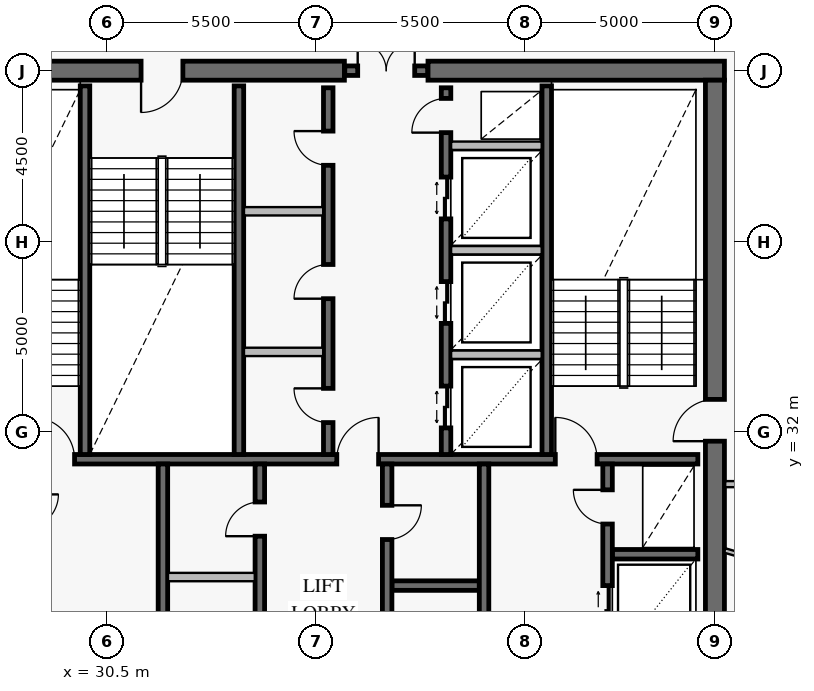
"""IFC4 building model, lengths in metres.
Left out: names, types, materials, properties, quantities, classifications, styles, units other than length and angle.
Written with IfcOpenShell. Run it as: python <this file> out.ifc"""

import sys

from ifc_helpers import new_model, si_unit, direction, frame, frame_2d, origin, place, context, subcontext, project, spatial, rectangle, extrude, element, fill, save


model = new_model("IFC4")
c1 = context("Model", 3, precision=1e-05, world=origin(), true_north=direction((0.0, 1.0)))
c2 = subcontext(c1, "Body", "Model", "MODEL_VIEW")
j1 = project(units=[si_unit("LENGTHUNIT", "METRE"), si_unit("PLANEANGLEUNIT", "RADIAN")], contexts=[c1])
p1 = place(None, origin())
s1 = spatial("IfcSite", under=j1, at=p1, CompositionType="ELEMENT")
p2 = place(p1, origin())
s2 = spatial("IfcBuilding", under=s1, at=p2, CompositionType="ELEMENT")
p3 = place(p2, frame((0.0, 0.0, 342.4)))
s3 = spatial("IfcBuildingStorey", under=s2, at=p3, CompositionType="ELEMENT", Elevation=342.4)
p4 = place(p3, frame((46.75, 41.5, 0.0), z_axis=(0.0, 0.0, 1.0), x_axis=(-1.0, 0.0, 0.0)))
e1 = element("IfcWall", 1, at=p4, inside=s3, PredefinedType="SHEAR", context=c2, shape_type="SweptSolid", body=[
    extrude(rectangle(XDim=7.8, YDim=0.5, at=frame_2d((3.9, 0.0))), origin(), (0.0, 0.0, 1.0), 3.8),
])
p5 = place(p3, frame((36.75, 41.5, 0.0), z_axis=(0.0, 0.0, 1.0), x_axis=(-1.0, 0.0, 0.0)))
e2 = element("IfcWall", 2, at=p5, inside=s3, PredefinedType="SHEAR", context=c2, shape_type="SweptSolid", body=[
    extrude(rectangle(XDim=11.5, YDim=0.5, at=frame_2d((5.75, 0.0))), origin(), (0.0, 0.0, 1.0), 3.8),
])
p6 = place(p5, frame((4.25, 0.0, 0.0)))
e3 = element("IfcOpeningElement", 3, at=p6, cuts=e2, PredefinedType="OPENING", context=c2, shape_type="SweptSolid", body=[
    extrude(rectangle(XDim=1.1, YDim=2.15, at=frame_2d((0.55, 1.075))), frame((0.0, 0.262, 0.0), z_axis=(0.0, -1.0, 0.0), x_axis=(1.0, 0.0, 0.0)), (0.0, 0.0, 1.0), 0.524),
])
p7 = place(p3, frame((46.5, 22.75, 0.0), z_axis=(0.0, 0.0, 1.0), x_axis=(0.0, 1.0, 0.0)))
e4 = element("IfcWall", 4, at=p7, inside=s3, PredefinedType="SHEAR", context=c2, shape_type="SweptSolid", body=[
    extrude(rectangle(XDim=18.5, YDim=0.5, at=frame_2d((9.25, 0.0))), origin(), (0.0, 0.0, 1.0), 3.8),
])
p8 = place(p7, frame((9.0, 0.0, 0.0)))
e5 = element("IfcOpeningElement", 5, at=p8, cuts=e4, PredefinedType="OPENING", context=c2, shape_type="SweptSolid", body=[
    extrude(rectangle(XDim=1.1, YDim=2.15, at=frame_2d((0.55, 1.075))), frame((0.0, 0.262, 0.0), z_axis=(0.0, -1.0, 0.0), x_axis=(1.0, 0.0, 0.0)), (0.0, 0.0, 1.0), 0.524),
])
p9 = place(p3, frame((36.76, 41.5, 0.0), z_axis=(0.0, 0.0, 1.0), x_axis=(1.0, 0.0, 0.0)))
e6 = element("IfcWall", 6, at=p9, inside=s3, PredefinedType="SOLIDWALL", context=c2, shape_type="SweptSolid", body=[
    extrude(rectangle(XDim=2.18, YDim=0.25, at=frame_2d((1.09, 0.0))), origin(), (0.0, 0.0, 1.0), 3.8),
])
p10 = place(p9, frame((0.34, 0.0, 0.0)))
e7 = element("IfcOpeningElement", 7, at=p10, cuts=e6, PredefinedType="OPENING", context=c2, shape_type="SweptSolid", body=[
    extrude(rectangle(XDim=1.5, YDim=2.15, at=frame_2d((0.75, 1.075))), frame((0.0, 0.137, 0.0), z_axis=(0.0, -1.0, 0.0), x_axis=(1.0, 0.0, 0.0)), (0.0, 0.0, 1.0), 0.274),
])
p11 = place(p3, frame((25.95, 31.275, 0.0), z_axis=(0.0, 0.0, 1.0), x_axis=(1.0, 0.0, 0.0)))
e8 = element("IfcWall", 8, at=p11, inside=s3, PredefinedType="SOLIDWALL", context=c2, shape_type="SweptSolid", body=[
    extrude(rectangle(XDim=20.1, YDim=0.25, at=frame_2d((10.05, 0.0))), origin(), (0.0, 0.0, 1.0), 3.8),
])
p12 = place(p11, frame((2.6, 0.0, 0.0)))
e9 = element("IfcOpeningElement", 9, at=p12, cuts=e8, PredefinedType="OPENING", context=c2, shape_type="SweptSolid", body=[
    extrude(rectangle(XDim=1.1, YDim=2.15, at=frame_2d((0.55, 1.075))), frame((0.0, 0.137, 0.0), z_axis=(0.0, -1.0, 0.0), x_axis=(1.0, 0.0, 0.0)), (0.0, 0.0, 1.0), 0.274),
])
p13 = place(p11, frame((10.6, 0.0, 0.0)))
e10 = element("IfcOpeningElement", 10, at=p13, cuts=e8, PredefinedType="OPENING", context=c2, shape_type="SweptSolid", body=[
    extrude(rectangle(XDim=1.1, YDim=2.15, at=frame_2d((0.55, 1.075))), frame((0.0, 0.137, 0.0), z_axis=(0.0, -1.0, 0.0), x_axis=(1.0, 0.0, 0.0)), (0.0, 0.0, 1.0), 0.274),
])
p14 = place(p11, frame((16.35, 0.0, 0.0)))
e11 = element("IfcOpeningElement", 11, at=p14, cuts=e8, PredefinedType="OPENING", context=c2, shape_type="SweptSolid", body=[
    extrude(rectangle(XDim=1.1, YDim=2.15, at=frame_2d((0.55, 1.075))), frame((0.0, 0.137, 0.0), z_axis=(0.0, -1.0, 0.0), x_axis=(1.0, 0.0, 0.0)), (0.0, 0.0, 1.0), 0.274),
])
for number, where, z_axis, x_axis in (
    (12, (29.925, 31.4, 0.0), (0.0, 0.0, 1.0), (0.0, 1.0, 0.0)),
    (13, (33.975, 31.4, 0.0), (0.0, 0.0, 1.0), (0.0, 1.0, 0.0)),
    (14, (42.075, 31.4, 0.0), (0.0, 0.0, 1.0), (0.0, 1.0, 0.0)),
):
    element("IfcWall", number, at=place(p3, frame(where, z_axis=z_axis, x_axis=x_axis)), inside=s3, PredefinedType="SOLIDWALL", context=c2, shape_type="SweptSolid", body=[
        extrude(rectangle(XDim=9.7, YDim=0.25, at=frame_2d((4.85, 0.0))), origin(), (0.0, 0.0, 1.0), 3.8),
    ])
p15 = place(p3, frame((36.325, 31.4, 0.0), z_axis=(0.0, 0.0, 1.0), x_axis=(0.0, 1.0, 0.0)))
e15 = element("IfcWall", 15, at=p15, inside=s3, PredefinedType="SOLIDWALL", context=c2, shape_type="SweptSolid", body=[
    extrude(rectangle(XDim=9.65, YDim=0.25, at=frame_2d((4.825, 0.0))), origin(), (0.0, 0.0, 1.0), 3.8),
])
p16 = place(p15, frame((0.84, 0.0, 0.0)))
e16 = element("IfcOpeningElement", 16, at=p16, cuts=e15, PredefinedType="OPENING", context=c2, shape_type="SweptSolid", body=[
    extrude(rectangle(XDim=0.9, YDim=2.1, at=frame_2d((0.45, 1.05))), frame((0.0, 0.137, 0.0), z_axis=(0.0, -1.0, 0.0), x_axis=(1.0, 0.0, 0.0)), (0.0, 0.0, 1.0), 0.274),
])
p17 = place(p15, frame((4.1, 0.0, 0.0)))
e17 = element("IfcOpeningElement", 17, at=p17, cuts=e15, PredefinedType="OPENING", context=c2, shape_type="SweptSolid", body=[
    extrude(rectangle(XDim=0.9, YDim=2.1, at=frame_2d((0.45, 1.05))), frame((0.0, 0.137, 0.0), z_axis=(0.0, -1.0, 0.0), x_axis=(1.0, 0.0, 0.0)), (0.0, 0.0, 1.0), 0.274),
])
p18 = place(p15, frame((7.61, 0.0, 0.0)))
e18 = element("IfcOpeningElement", 18, at=p18, cuts=e15, PredefinedType="OPENING", context=c2, shape_type="SweptSolid", body=[
    extrude(rectangle(XDim=0.9, YDim=2.1, at=frame_2d((0.45, 1.05))), frame((0.0, 0.137, 0.0), z_axis=(0.0, -1.0, 0.0), x_axis=(1.0, 0.0, 0.0)), (0.0, 0.0, 1.0), 0.274),
])
p19 = place(p3, frame((39.425, 31.4, 0.0), z_axis=(0.0, 0.0, 1.0), x_axis=(0.0, 1.0, 0.0)))
e19 = element("IfcWall", 19, at=p19, inside=s3, PredefinedType="SOLIDWALL", context=c2, shape_type="SweptSolid", body=[
    extrude(rectangle(XDim=9.65, YDim=0.25, at=frame_2d((4.825, 0.0))), origin(), (0.0, 0.0, 1.0), 3.8),
])
p20 = place(p19, frame((0.7, 0.0, 0.0)))
e20 = element("IfcOpeningElement", 20, at=p20, cuts=e19, PredefinedType="OPENING", context=c2, shape_type="SweptSolid", body=[
    extrude(rectangle(XDim=1.1, YDim=2.2, at=frame_2d((0.55, 1.1))), frame((0.0, 0.137, 0.0), z_axis=(0.0, -1.0, 0.0), x_axis=(1.0, 0.0, 0.0)), (0.0, 0.0, 1.0), 0.274),
])
p21 = place(p19, frame((3.45, 0.0, 0.0)))
e21 = element("IfcOpeningElement", 21, at=p21, cuts=e19, PredefinedType="OPENING", context=c2, shape_type="SweptSolid", body=[
    extrude(rectangle(XDim=1.1, YDim=2.2, at=frame_2d((0.55, 1.1))), frame((0.0, 0.137, 0.0), z_axis=(0.0, -1.0, 0.0), x_axis=(1.0, 0.0, 0.0)), (0.0, 0.0, 1.0), 0.274),
])
p22 = place(p19, frame((6.2, 0.0, 0.0)))
e22 = element("IfcOpeningElement", 22, at=p22, cuts=e19, PredefinedType="OPENING", context=c2, shape_type="SweptSolid", body=[
    extrude(rectangle(XDim=1.1, YDim=2.2, at=frame_2d((0.55, 1.1))), frame((0.0, 0.137, 0.0), z_axis=(0.0, -1.0, 0.0), x_axis=(1.0, 0.0, 0.0)), (0.0, 0.0, 1.0), 0.274),
])
p23 = place(p19, frame((8.47, 0.0, 0.0)))
e23 = element("IfcOpeningElement", 23, at=p23, cuts=e19, PredefinedType="OPENING", context=c2, shape_type="SweptSolid", body=[
    extrude(rectangle(XDim=0.9, YDim=2.1, at=frame_2d((0.45, 1.05))), frame((0.0, 0.137, 0.0), z_axis=(0.0, -1.0, 0.0), x_axis=(1.0, 0.0, 0.0)), (0.0, 0.0, 1.0), 0.274),
])
p24 = place(p3, frame((31.975, 22.95, 0.0), z_axis=(0.0, 0.0, 1.0), x_axis=(0.0, 1.0, 0.0)))
e24 = element("IfcWall", 24, at=p24, inside=s3, PredefinedType="SOLIDWALL", context=c2, shape_type="SweptSolid", body=[
    extrude(rectangle(XDim=8.2, YDim=0.25, at=frame_2d((4.1, 0.0))), origin(), (0.0, 0.0, 1.0), 3.8),
])
p25 = place(p3, frame((34.525, 22.95, 0.0), z_axis=(0.0, 0.0, 1.0), x_axis=(0.0, 1.0, 0.0)))
e25 = element("IfcWall", 25, at=p25, inside=s3, PredefinedType="SOLIDWALL", context=c2, shape_type="SweptSolid", body=[
    extrude(rectangle(XDim=8.2, YDim=0.25, at=frame_2d((4.1, 0.0))), origin(), (0.0, 0.0, 1.0), 3.8),
])
p26 = place(p25, frame((2.1, 0.0, 0.0)))
e26 = element("IfcOpeningElement", 26, at=p26, cuts=e25, PredefinedType="OPENING", context=c2, shape_type="SweptSolid", body=[
    extrude(rectangle(XDim=0.9, YDim=2.1, at=frame_2d((0.45, 1.05))), frame((0.0, 0.137, 0.0), z_axis=(0.0, -1.0, 0.0), x_axis=(1.0, 0.0, 0.0)), (0.0, 0.0, 1.0), 0.274),
])
p27 = place(p25, frame((6.3, 0.0, 0.0)))
e27 = element("IfcOpeningElement", 27, at=p27, cuts=e25, PredefinedType="OPENING", context=c2, shape_type="SweptSolid", body=[
    extrude(rectangle(XDim=0.9, YDim=2.1, at=frame_2d((0.45, 1.05))), frame((0.0, 0.137, 0.0), z_axis=(0.0, -1.0, 0.0), x_axis=(1.0, 0.0, 0.0)), (0.0, 0.0, 1.0), 0.274),
])
p28 = place(p3, frame((38.0, 27.95, 0.0), z_axis=(0.0, 0.0, 1.0), x_axis=(1.0, 0.0, 0.0)))
e28 = element("IfcWall", 28, at=p28, inside=s3, PredefinedType="SOLIDWALL", context=c2, shape_type="SweptSolid", body=[
    extrude(rectangle(XDim=2.3, YDim=0.25, at=frame_2d((1.15, 0.0))), origin(), (0.0, 0.0, 1.0), 3.8),
])
p29 = place(p3, frame((37.875, 22.95, 0.0), z_axis=(0.0, 0.0, 1.0), x_axis=(0.0, 1.0, 0.0)))
e29 = element("IfcWall", 29, at=p29, inside=s3, PredefinedType="SOLIDWALL", context=c2, shape_type="SweptSolid", body=[
    extrude(rectangle(XDim=8.2, YDim=0.25, at=frame_2d((4.1, 0.0))), origin(), (0.0, 0.0, 1.0), 3.8),
])
p30 = place(p29, frame((2.012, 0.0, 0.0)))
e30 = element("IfcOpeningElement", 30, at=p30, cuts=e29, PredefinedType="OPENING", context=c2, shape_type="SweptSolid", body=[
    extrude(rectangle(XDim=0.9, YDim=2.1, at=frame_2d((0.45, 1.05))), frame((0.0, 0.137, 0.0), z_axis=(0.0, -1.0, 0.0), x_axis=(1.0, 0.0, 0.0)), (0.0, 0.0, 1.0), 0.274),
])
p31 = place(p29, frame((6.212, 0.0, 0.0)))
e31 = element("IfcOpeningElement", 31, at=p31, cuts=e29, PredefinedType="OPENING", context=c2, shape_type="SweptSolid", body=[
    extrude(rectangle(XDim=0.9, YDim=2.1, at=frame_2d((0.45, 1.05))), frame((0.0, 0.137, 0.0), z_axis=(0.0, -1.0, 0.0), x_axis=(1.0, 0.0, 0.0)), (0.0, 0.0, 1.0), 0.274),
])
p32 = place(p3, frame((40.425, 22.95, 0.0), z_axis=(0.0, 0.0, 1.0), x_axis=(0.0, 1.0, 0.0)))
e32 = element("IfcWall", 32, at=p32, inside=s3, PredefinedType="SOLIDWALL", context=c2, shape_type="SweptSolid", body=[
    extrude(rectangle(XDim=8.2, YDim=0.25, at=frame_2d((4.1, 0.0))), origin(), (0.0, 0.0, 1.0), 3.8),
])
p33 = place(p3, frame((43.8, 28.775, 0.0), z_axis=(0.0, 0.0, 1.0), x_axis=(1.0, 0.0, 0.0)))
e33 = element("IfcWall", 33, at=p33, inside=s3, PredefinedType="SOLIDWALL", context=c2, shape_type="SweptSolid", body=[
    extrude(rectangle(XDim=2.25, YDim=0.25, at=frame_2d((1.125, 0.0))), origin(), (0.0, 0.0, 1.0), 3.8),
])
p34 = place(p3, frame((43.675, 22.95, 0.0), z_axis=(0.0, 0.0, 1.0), x_axis=(0.0, 1.0, 0.0)))
e34 = element("IfcWall", 34, at=p34, inside=s3, PredefinedType="SOLIDWALL", context=c2, shape_type="SweptSolid", body=[
    extrude(rectangle(XDim=8.2, YDim=0.25, at=frame_2d((4.1, 0.0))), origin(), (0.0, 0.0, 1.0), 3.8),
])
p35 = place(p34, frame((0.75, 0.0, 0.0)))
e35 = element("IfcOpeningElement", 35, at=p35, cuts=e34, PredefinedType="OPENING", context=c2, shape_type="SweptSolid", body=[
    extrude(rectangle(XDim=1.3, YDim=2.3, at=frame_2d((0.65, 1.15))), frame((0.0, 0.137, 0.0), z_axis=(0.0, -1.0, 0.0), x_axis=(1.0, 0.0, 0.0)), (0.0, 0.0, 1.0), 0.274),
])
p36 = place(p34, frame((3.7, 0.0, 0.0)))
e36 = element("IfcOpeningElement", 36, at=p36, cuts=e34, PredefinedType="OPENING", context=c2, shape_type="SweptSolid", body=[
    extrude(rectangle(XDim=1.3, YDim=2.3, at=frame_2d((0.65, 1.15))), frame((0.0, 0.137, 0.0), z_axis=(0.0, -1.0, 0.0), x_axis=(1.0, 0.0, 0.0)), (0.0, 0.0, 1.0), 0.274),
])
p37 = place(p34, frame((6.62, 0.0, 0.0)))
e37 = element("IfcOpeningElement", 37, at=p37, cuts=e34, PredefinedType="OPENING", context=c2, shape_type="SweptSolid", body=[
    extrude(rectangle(XDim=0.9, YDim=2.1, at=frame_2d((0.45, 1.05))), frame((0.0, 0.137, 0.0), z_axis=(0.0, -1.0, 0.0), x_axis=(1.0, 0.0, 0.0)), (0.0, 0.0, 1.0), 0.274),
])
p38 = place(p3, frame((46.758, 28.875, 0.0), z_axis=(0.0, 0.0, 1.0), x_axis=(0.960290635707, -0.279001603891, 0.0)))
e38 = element("IfcWall", 38, at=p38, inside=s3, PredefinedType="PARTITIONING", context=c2, shape_type="SweptSolid", body=[
    extrude(rectangle(XDim=3.757, YDim=0.12, at=frame_2d((1.878, 0.0))), origin(), (0.0, 0.0, 1.0), 3.0),
])
p39 = place(p38, frame((1.108, 0.0, 0.0)))
e39 = element("IfcOpeningElement", 39, at=p39, cuts=e38, PredefinedType="OPENING", context=c2, shape_type="SweptSolid", body=[
    extrude(rectangle(XDim=0.9, YDim=2.1, at=frame_2d((0.45, 1.05))), frame((0.0, 0.072, 0.0), z_axis=(0.0, -1.0, 0.0), x_axis=(1.0, 0.0, 0.0)), (0.0, 0.0, 1.0), 0.144),
])
for number, where, z_axis, x_axis in (
    (40, (34.108, 34.1, 0.0), (0.0, 0.0, 1.0), (1.0, 0.0, 0.0)),
    (41, (34.108, 37.8, 0.0), (0.0, 0.0, 1.0), (1.0, 0.0, 0.0)),
):
    element("IfcWall", number, at=place(p3, frame(where, z_axis=z_axis, x_axis=x_axis)), inside=s3, PredefinedType="PARTITIONING", context=c2, shape_type="SweptSolid", body=[
        extrude(rectangle(XDim=2.084, YDim=0.22, at=frame_2d((1.042, 0.0))), origin(), (0.0, 0.0, 1.0), 3.55),
    ])
for number, where, z_axis, x_axis in (
    (42, (39.558, 34.025, 0.0), (0.0, 0.0, 1.0), (1.0, 0.0, 0.0)),
    (43, (39.558, 36.775, 0.0), (0.0, 0.0, 1.0), (1.0, 0.0, 0.0)),
    (44, (39.558, 39.525, 0.0), (0.0, 0.0, 1.0), (1.0, 0.0, 0.0)),
):
    element("IfcWall", number, at=place(p3, frame(where, z_axis=z_axis, x_axis=x_axis)), inside=s3, PredefinedType="PARTITIONING", context=c2, shape_type="SweptSolid", body=[
        extrude(rectangle(XDim=2.384, YDim=0.22, at=frame_2d((1.192, 0.0))), origin(), (0.0, 0.0, 1.0), 3.55),
    ])
p40 = place(p3, frame((32.108, 28.175, 0.0), z_axis=(0.0, 0.0, 1.0), x_axis=(1.0, 0.0, 0.0)))
e45 = element("IfcWall", 45, at=p40, inside=s3, PredefinedType="PARTITIONING", context=c2, shape_type="SweptSolid", body=[
    extrude(rectangle(XDim=2.284, YDim=0.22, at=frame_2d((1.142, 0.0))), origin(), (0.0, 0.0, 1.0), 3.55),
])
p41 = place(p3, frame((46.77, 30.62, 0.0), z_axis=(0.0, 0.0, 1.0), x_axis=(1.0, 0.0, 0.0)))
e46 = element("IfcWall", 46, at=p41, inside=s3, PredefinedType="PARTITIONING", context=c2, shape_type="SweptSolid", body=[
    extrude(rectangle(XDim=2.03, YDim=0.16, at=frame_2d((1.015, 0.0))), origin(), (0.0, 0.0, 1.0), 3.55),
])
p42 = place(p8, origin())
e47 = element("IfcDoor", 47, at=p42, inside=s3, OperationType="SINGLE_SWING_LEFT", PredefinedType="USERDEFINED", context=c2, shape_type="SweptSolid", body=[
    extrude(rectangle(XDim=1.1, YDim=2.15, at=frame_2d((0.55, 1.075))), frame((0.0, 0.025, 0.0), z_axis=(0.0, -1.0, 0.0), x_axis=(1.0, 0.0, 0.0)), (0.0, 0.0, 1.0), 0.05),
])
fill(e5, e47)
p43 = place(p6, origin())
e48 = element("IfcDoor", 48, at=p43, inside=s3, OperationType="SINGLE_SWING_RIGHT", PredefinedType="USERDEFINED", context=c2, shape_type="SweptSolid", body=[
    extrude(rectangle(XDim=1.1, YDim=2.15, at=frame_2d((0.55, 1.075))), frame((0.0, 0.025, 0.0), z_axis=(0.0, -1.0, 0.0), x_axis=(1.0, 0.0, 0.0)), (0.0, 0.0, 1.0), 0.05),
])
fill(e3, e48)
p44 = place(p10, origin())
e49 = element("IfcDoor", 49, at=p44, inside=s3, OperationType="DOUBLE_DOOR_SINGLE_SWING", PredefinedType="DOOR", context=c2, shape_type="SweptSolid", body=[
    extrude(rectangle(XDim=1.5, YDim=2.15, at=frame_2d((0.75, 1.075))), frame((0.0, 0.025, 0.0), z_axis=(0.0, -1.0, 0.0), x_axis=(1.0, 0.0, 0.0)), (0.0, 0.0, 1.0), 0.05),
])
fill(e7, e49)
p45 = place(p12, origin())
e50 = element("IfcDoor", 50, at=p45, inside=s3, OperationType="SINGLE_SWING_LEFT", PredefinedType="USERDEFINED", context=c2, shape_type="SweptSolid", body=[
    extrude(rectangle(XDim=1.1, YDim=2.15, at=frame_2d((0.55, 1.075))), frame((0.0, 0.025, 0.0), z_axis=(0.0, -1.0, 0.0), x_axis=(1.0, 0.0, 0.0)), (0.0, 0.0, 1.0), 0.05),
])
fill(e9, e50)
p46 = place(p13, origin())
e51 = element("IfcDoor", 51, at=p46, inside=s3, OperationType="SINGLE_SWING_RIGHT", PredefinedType="USERDEFINED", context=c2, shape_type="SweptSolid", body=[
    extrude(rectangle(XDim=1.1, YDim=2.15, at=frame_2d((0.55, 1.075))), frame((0.0, 0.025, 0.0), z_axis=(0.0, -1.0, 0.0), x_axis=(1.0, 0.0, 0.0)), (0.0, 0.0, 1.0), 0.05),
])
fill(e10, e51)
p47 = place(p14, origin())
e52 = element("IfcDoor", 52, at=p47, inside=s3, OperationType="SINGLE_SWING_LEFT", PredefinedType="USERDEFINED", context=c2, shape_type="SweptSolid", body=[
    extrude(rectangle(XDim=1.1, YDim=2.15, at=frame_2d((0.55, 1.075))), frame((0.0, 0.025, 0.0), z_axis=(0.0, -1.0, 0.0), x_axis=(1.0, 0.0, 0.0)), (0.0, 0.0, 1.0), 0.05),
])
fill(e11, e52)
p48 = place(p16, origin())
e53 = element("IfcDoor", 53, at=p48, inside=s3, OperationType="SINGLE_SWING_RIGHT", PredefinedType="DOOR", context=c2, shape_type="SweptSolid", body=[
    extrude(rectangle(XDim=0.9, YDim=2.1, at=frame_2d((0.45, 1.05))), frame((0.0, 0.025, 0.0), z_axis=(0.0, -1.0, 0.0), x_axis=(1.0, 0.0, 0.0)), (0.0, 0.0, 1.0), 0.05),
])
fill(e16, e53)
p49 = place(p17, origin())
e54 = element("IfcDoor", 54, at=p49, inside=s3, OperationType="SINGLE_SWING_LEFT", PredefinedType="DOOR", context=c2, shape_type="SweptSolid", body=[
    extrude(rectangle(XDim=0.9, YDim=2.1, at=frame_2d((0.45, 1.05))), frame((0.0, 0.025, 0.0), z_axis=(0.0, -1.0, 0.0), x_axis=(1.0, 0.0, 0.0)), (0.0, 0.0, 1.0), 0.05),
])
fill(e17, e54)
p50 = place(p18, origin())
e55 = element("IfcDoor", 55, at=p50, inside=s3, OperationType="SINGLE_SWING_RIGHT", PredefinedType="DOOR", context=c2, shape_type="SweptSolid", body=[
    extrude(rectangle(XDim=0.9, YDim=2.1, at=frame_2d((0.45, 1.05))), frame((0.0, 0.025, 0.0), z_axis=(0.0, -1.0, 0.0), x_axis=(1.0, 0.0, 0.0)), (0.0, 0.0, 1.0), 0.05),
])
fill(e18, e55)
p51 = place(p20, origin())
e56 = element("IfcDoor", 56, at=p51, inside=s3, OperationType="DOUBLE_DOOR_SLIDING", PredefinedType="DOOR", context=c2, shape_type="SweptSolid", body=[
    extrude(rectangle(XDim=1.1, YDim=2.2, at=frame_2d((0.55, 1.1))), frame((0.0, 0.025, 0.0), z_axis=(0.0, -1.0, 0.0), x_axis=(1.0, 0.0, 0.0)), (0.0, 0.0, 1.0), 0.05),
])
fill(e20, e56)
p52 = place(p21, origin())
e57 = element("IfcDoor", 57, at=p52, inside=s3, OperationType="DOUBLE_DOOR_SLIDING", PredefinedType="DOOR", context=c2, shape_type="SweptSolid", body=[
    extrude(rectangle(XDim=1.1, YDim=2.2, at=frame_2d((0.55, 1.1))), frame((0.0, 0.025, 0.0), z_axis=(0.0, -1.0, 0.0), x_axis=(1.0, 0.0, 0.0)), (0.0, 0.0, 1.0), 0.05),
])
fill(e21, e57)
p53 = place(p22, origin())
e58 = element("IfcDoor", 58, at=p53, inside=s3, OperationType="DOUBLE_DOOR_SLIDING", PredefinedType="DOOR", context=c2, shape_type="SweptSolid", body=[
    extrude(rectangle(XDim=1.1, YDim=2.2, at=frame_2d((0.55, 1.1))), frame((0.0, 0.025, 0.0), z_axis=(0.0, -1.0, 0.0), x_axis=(1.0, 0.0, 0.0)), (0.0, 0.0, 1.0), 0.05),
])
fill(e22, e58)
p54 = place(p23, origin())
e59 = element("IfcDoor", 59, at=p54, inside=s3, OperationType="SINGLE_SWING_LEFT", PredefinedType="DOOR", context=c2, shape_type="SweptSolid", body=[
    extrude(rectangle(XDim=0.9, YDim=2.1, at=frame_2d((0.45, 1.05))), frame((0.0, 0.025, 0.0), z_axis=(0.0, -1.0, 0.0), x_axis=(1.0, 0.0, 0.0)), (0.0, 0.0, 1.0), 0.05),
])
fill(e23, e59)
p55 = place(p27, origin())
e60 = element("IfcDoor", 60, at=p55, inside=s3, OperationType="SINGLE_SWING_LEFT", PredefinedType="DOOR", context=c2, shape_type="SweptSolid", body=[
    extrude(rectangle(XDim=0.9, YDim=2.1, at=frame_2d((0.45, 1.05))), frame((0.0, 0.025, 0.0), z_axis=(0.0, -1.0, 0.0), x_axis=(1.0, 0.0, 0.0)), (0.0, 0.0, 1.0), 0.05),
])
fill(e27, e60)
p56 = place(p31, frame((0.9, 0.0, 0.0), z_axis=(0.0, 0.0, 1.0), x_axis=(-1.0, 0.0, 0.0)))
e61 = element("IfcDoor", 61, at=p56, inside=s3, OperationType="SINGLE_SWING_LEFT", PredefinedType="DOOR", context=c2, shape_type="SweptSolid", body=[
    extrude(rectangle(XDim=0.9, YDim=2.1, at=frame_2d((0.45, 1.05))), frame((0.0, 0.025, 0.0), z_axis=(0.0, -1.0, 0.0), x_axis=(1.0, 0.0, 0.0)), (0.0, 0.0, 1.0), 0.05),
])
fill(e31, e61)
p57 = place(p36, origin())
e62 = element("IfcDoor", 62, at=p57, inside=s3, OperationType="DOUBLE_DOOR_SLIDING", PredefinedType="DOOR", context=c2, shape_type="SweptSolid", body=[
    extrude(rectangle(XDim=1.3, YDim=2.3, at=frame_2d((0.65, 1.15))), frame((0.0, 0.025, 0.0), z_axis=(0.0, -1.0, 0.0), x_axis=(1.0, 0.0, 0.0)), (0.0, 0.0, 1.0), 0.05),
])
fill(e36, e62)
p58 = place(p37, origin())
e63 = element("IfcDoor", 63, at=p58, inside=s3, OperationType="SINGLE_SWING_RIGHT", PredefinedType="DOOR", context=c2, shape_type="SweptSolid", body=[
    extrude(rectangle(XDim=0.9, YDim=2.1, at=frame_2d((0.45, 1.05))), frame((0.0, 0.025, 0.0), z_axis=(0.0, -1.0, 0.0), x_axis=(1.0, 0.0, 0.0)), (0.0, 0.0, 1.0), 0.05),
])
fill(e37, e63)
save(model, sys.argv[1])
